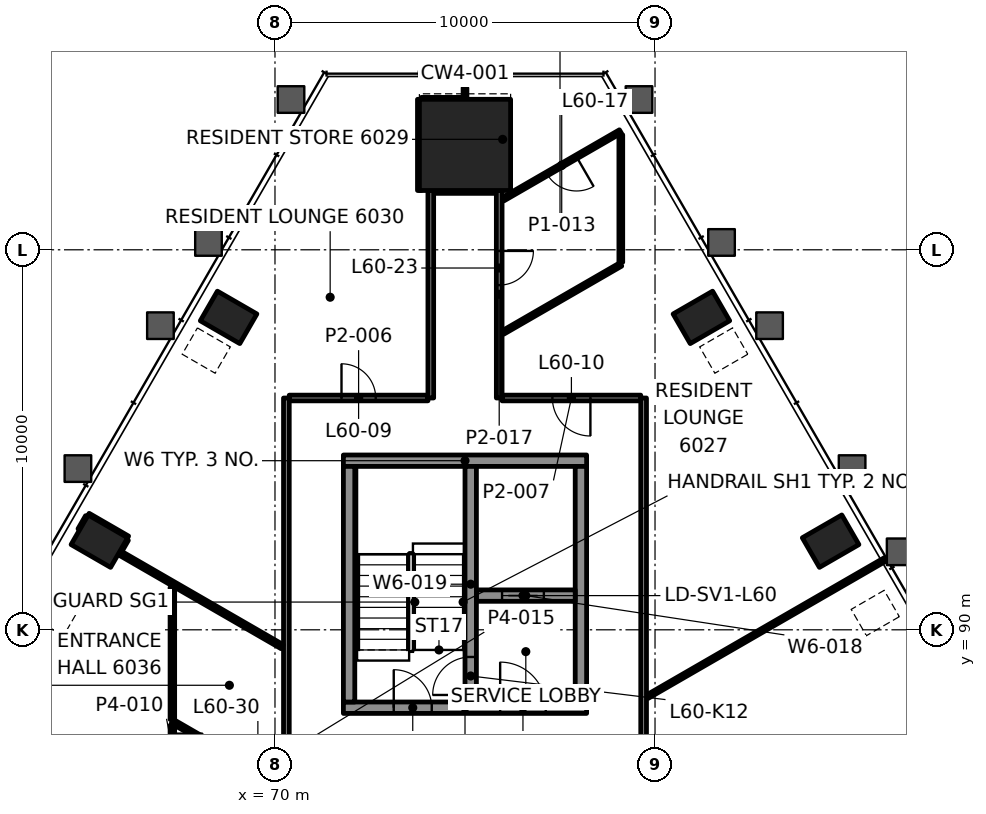
"""IFC4 building model, lengths in metres.
Left out: names, types, materials, properties, quantities, classifications, styles, units other than length and angle.
Written with IfcOpenShell. Run it as: python <this file> out.ifc"""

import sys

from ifc_helpers import new_model, si_unit, direction, frame, frame_2d, origin, origin_2d, place, context, subcontext, project, spatial, rectangle, hollow_rectangle, extrude, element, fill, save


model = new_model("IFC4")
c1 = context("Model", 3, precision=1e-05, world=origin(), true_north=direction((0.0, 1.0)))
c2 = subcontext(c1, "Body", "Model", "MODEL_VIEW")
j1 = project(units=[si_unit("LENGTHUNIT", "METRE"), si_unit("PLANEANGLEUNIT", "RADIAN")], contexts=[c1])
p1 = place(None, origin())
s1 = spatial("IfcSite", under=j1, at=p1, CompositionType="ELEMENT")
p2 = place(p1, origin())
s2 = spatial("IfcBuilding", under=s1, at=p2, CompositionType="ELEMENT")
p3 = place(p2, frame((0.0, 0.0, 256.6)))
s3 = spatial("IfcBuildingStorey", under=s2, at=p3, CompositionType="ELEMENT", Elevation=256.6)
p4 = place(p3, frame((75.0, 102.76, 0.0), z_axis=(0.0, 0.0, 1.0), x_axis=(-1.0, 0.0, 0.0)))
e1 = element("IfcColumn", 1, at=p4, inside=s3, PredefinedType="COLUMN", context=c2, shape_type="SweptSolid", body=[
    extrude(rectangle(XDim=2.4, YDim=2.4, at=origin_2d()), origin(), (0.0, 0.0, 1.0), 3.5),
])
for number, where, z_axis, x_axis in (
    (2, (84.621, 92.332, -0.0), (0.0, 0.0, 1.0), (-0.5, 0.866, 0.0)),
    (3, (81.22, 98.221, -0.0), (0.0, 0.0, 1.0), (-0.5, 0.866, 0.0)),
    (4, (68.78, 98.221, -0.0), (0.0, 0.0, 1.0), (-0.5, -0.866, 0.0)),
    (5, (65.379, 92.332, -0.0), (0.0, 0.0, 1.0), (-0.5, -0.866, 0.0)),
):
    element("IfcColumn", number, at=place(p3, frame(where, z_axis=z_axis, x_axis=x_axis)), inside=s3, PredefinedType="COLUMN", context=c2, shape_type="SweptSolid", body=[
        extrude(hollow_rectangle(XDim=0.9, YDim=1.2, WallThickness=0.06, at=origin_2d()), origin(), (0.0, 0.0, 1.0), 3.5),
    ])
p5 = place(p3, frame((71.8, 87.95, 0.0), z_axis=(0.0, 0.0, 1.0), x_axis=(1.0, 0.0, 0.0)))
e6 = element("IfcWall", 6, at=p5, inside=s3, PredefinedType="SHEAR", context=c2, shape_type="SweptSolid", body=[
    extrude(rectangle(XDim=6.4, YDim=0.3, at=frame_2d((3.2, 0.0))), origin(), (0.0, 0.0, 1.0), 3.3),
])
p6 = place(p5, frame((1.325, 0.0, 0.0)))
e7 = element("IfcOpeningElement", 7, at=p6, cuts=e6, PredefinedType="OPENING", context=c2, shape_type="SweptSolid", body=[
    extrude(rectangle(XDim=1.0, YDim=2.1, at=frame_2d((0.5, 1.05))), frame((0.0, 0.16, 0.0), z_axis=(0.0, -1.0, 0.0), x_axis=(1.0, 0.0, 0.0)), (0.0, 0.0, 1.0), 0.32),
])
p7 = place(p5, frame((4.125, 0.0, 0.0)))
e8 = element("IfcOpeningElement", 8, at=p7, cuts=e6, PredefinedType="OPENING", context=c2, shape_type="SweptSolid", body=[
    extrude(rectangle(XDim=1.2, YDim=2.1, at=frame_2d((0.6, 1.05))), frame((0.0, 0.16, 0.0), z_axis=(0.0, -1.0, 0.0), x_axis=(1.0, 0.0, 0.0)), (0.0, 0.0, 1.0), 0.32),
])
p8 = place(p3, frame((71.8, 94.45, 0.0), z_axis=(0.0, 0.0, 1.0), x_axis=(1.0, 0.0, 0.0)))
e9 = element("IfcWall", 9, at=p8, inside=s3, PredefinedType="SHEAR", context=c2, shape_type="SweptSolid", body=[
    extrude(rectangle(XDim=6.4, YDim=0.3, at=frame_2d((3.2, 0.0))), origin(), (0.0, 0.0, 1.0), 3.3),
])
for number, where, z_axis, x_axis in (
    (10, (71.95, 88.1, 0.0), (0.0, 0.0, 1.0), (0.0, 1.0, 0.0)),
    (11, (78.05, 88.1, 0.0), (0.0, 0.0, 1.0), (0.0, 1.0, 0.0)),
):
    element("IfcWall", number, at=place(p3, frame(where, z_axis=z_axis, x_axis=x_axis)), inside=s3, PredefinedType="SHEAR", context=c2, shape_type="SweptSolid", body=[
        extrude(rectangle(XDim=6.2, YDim=0.3, at=frame_2d((3.1, 0.0))), origin(), (0.0, 0.0, 1.0), 3.3),
    ])
p9 = place(p3, frame((75.3, 90.9, 0.0), z_axis=(0.0, 0.0, 1.0), x_axis=(1.0, 0.0, 0.0)))
e12 = element("IfcWall", 12, at=p9, inside=s3, PredefinedType="SHEAR", context=c2, shape_type="SweptSolid", body=[
    extrude(rectangle(XDim=2.6, YDim=0.3, at=frame_2d((1.3, 0.0))), origin(), (0.0, 0.0, 1.0), 3.3),
])
p10 = place(p9, frame((0.675, 0.0, 0.0)))
e13 = element("IfcOpeningElement", 13, at=p10, cuts=e12, PredefinedType="OPENING", context=c2, shape_type="SweptSolid", body=[
    extrude(rectangle(XDim=1.1, YDim=2.1, at=frame_2d((0.55, 1.05))), frame((0.0, 0.16, 0.0), z_axis=(0.0, -1.0, 0.0), x_axis=(1.0, 0.0, 0.0)), (0.0, 0.0, 1.0), 0.32),
])
p11 = place(p3, frame((75.15, 88.1, 0.0), z_axis=(0.0, 0.0, 1.0), x_axis=(0.0, 1.0, 0.0)))
e14 = element("IfcWall", 14, at=p11, inside=s3, PredefinedType="SHEAR", context=c2, shape_type="SweptSolid", body=[
    extrude(rectangle(XDim=6.2, YDim=0.3, at=frame_2d((3.1, 0.0))), origin(), (0.0, 0.0, 1.0), 3.3),
])
p12 = place(p11, frame((0.185, 0.0, 0.0)))
e15 = element("IfcOpeningElement", 15, at=p12, cuts=e14, PredefinedType="OPENING", context=c2, shape_type="SweptSolid", body=[
    extrude(rectangle(XDim=1.0, YDim=2.1, at=frame_2d((0.5, 1.05))), frame((0.0, 0.16, 0.0), z_axis=(0.0, -1.0, 0.0), x_axis=(1.0, 0.0, 0.0)), (0.0, 0.0, 1.0), 0.32),
])
p13 = place(p3, frame((70.375, 96.1, 0.0), z_axis=(0.0, 0.0, 1.0), x_axis=(1.0, 0.0, 0.0)))
e16 = element("IfcWall", 16, at=p13, inside=s3, PredefinedType="PARTITIONING", context=c2, shape_type="SweptSolid", body=[
    extrude(rectangle(XDim=3.649, YDim=0.15, at=frame_2d((1.825, 0.0))), origin(), (0.0, 0.0, 1.0), 2.7),
])
p14 = place(p13, frame((1.375, 0.0, 0.0)))
e17 = element("IfcOpeningElement", 17, at=p14, cuts=e16, PredefinedType="OPENING", context=c2, shape_type="SweptSolid", body=[
    extrude(rectangle(XDim=0.9, YDim=2.1, at=frame_2d((0.45, 1.05))), frame((0.0, 0.085, 0.0), z_axis=(0.0, -1.0, 0.0), x_axis=(1.0, 0.0, 0.0)), (0.0, 0.0, 1.0), 0.17),
])
p15 = place(p3, frame((79.625, 96.1, 0.0), z_axis=(0.0, 0.0, 1.0), x_axis=(-1.0, 0.0, 0.0)))
e18 = element("IfcWall", 18, at=p15, inside=s3, PredefinedType="PARTITIONING", context=c2, shape_type="SweptSolid", body=[
    extrude(rectangle(XDim=3.649, YDim=0.15, at=frame_2d((1.825, 0.0))), origin(), (0.0, 0.0, 1.0), 2.7),
])
p16 = place(p15, frame((1.325, 0.0, 0.0)))
e19 = element("IfcOpeningElement", 19, at=p16, cuts=e18, PredefinedType="OPENING", context=c2, shape_type="SweptSolid", body=[
    extrude(rectangle(XDim=1.0, YDim=2.1, at=frame_2d((0.5, 1.05))), frame((0.0, 0.085, 0.0), z_axis=(0.0, -1.0, 0.0), x_axis=(1.0, 0.0, 0.0)), (0.0, 0.0, 1.0), 0.17),
])
p17 = place(p3, frame((74.18, 101.56, 0.0), z_axis=(0.0, 0.0, 1.0), x_axis=(1.0, 0.0, 0.0)))
e20 = element("IfcWall", 20, at=p17, inside=s3, PredefinedType="PARTITIONING", context=c2, shape_type="SweptSolid", body=[
    extrude(rectangle(XDim=1.644, YDim=0.15, at=frame_2d((0.822, 0.0))), origin(), (0.0, 0.0, 1.0), 2.697),
])
p18 = place(p3, frame((73.851, 103.96, 0.0), z_axis=(0.0, 0.0, 1.0), x_axis=(1.0, 0.0, 0.0)))
e21 = element("IfcWall", 21, at=p18, inside=s3, PredefinedType="PARTITIONING", context=c2, shape_type="SweptSolid", body=[
    extrude(rectangle(XDim=1.149, YDim=0.1, at=frame_2d((0.575, 0.0))), origin(), (0.0, 0.0, 1.0), 2.7),
])
p19 = place(p3, frame((79.801, 88.241, 0.0), z_axis=(0.0, 0.0, 1.0), x_axis=(0.866016076598, 0.500016154812, 0.0)))
e22 = element("IfcWall", 22, at=p19, inside=s3, PredefinedType="PARTITIONING", context=c2, shape_type="SweptSolid", body=[
    extrude(rectangle(XDim=7.219, YDim=0.1, at=frame_2d((3.61, 0.0))), origin(), (0.0, 0.0, 1.0), 2.688),
])
p20 = place(p3, frame((76.001, 97.825, 0.0), z_axis=(0.0, 0.0, 1.0), x_axis=(0.866021986329, 0.500005919159, 0.0)))
e23 = element("IfcWall", 23, at=p20, inside=s3, PredefinedType="PARTITIONING", context=c2, shape_type="SweptSolid", body=[
    extrude(rectangle(XDim=3.579, YDim=0.1, at=frame_2d((1.789, 0.0))), origin(), (0.0, 0.0, 1.0), 2.7),
])
p21 = place(p3, frame((79.089, 103.114, 0.0), z_axis=(0.0, 0.0, 1.0), x_axis=(-0.866000835515, -0.500042551078, 0.0)))
e24 = element("IfcWall", 24, at=p21, inside=s3, PredefinedType="PARTITIONING", context=c2, shape_type="SweptSolid", body=[
    extrude(rectangle(XDim=3.565, YDim=0.1, at=frame_2d((1.783, 0.0))), origin(), (0.0, 0.0, 1.0), 2.7),
])
p22 = place(p21, frame((1.333, 0.0, 0.0)))
e25 = element("IfcOpeningElement", 25, at=p22, cuts=e24, PredefinedType="OPENING", context=c2, shape_type="SweptSolid", body=[
    extrude(rectangle(XDim=0.9, YDim=2.1, at=frame_2d((0.45, 1.05))), frame((0.0, 0.06, 0.0), z_axis=(0.0, -1.0, 0.0), x_axis=(1.0, 0.0, 0.0)), (0.0, 0.0, 1.0), 0.12),
])
p23 = place(p3, frame((65.929, 92.085, 0.0), z_axis=(0.0, 0.0, 1.0), x_axis=(0.49970167553, 0.866197573001, 0.0)))
e26 = element("IfcWall", 26, at=p23, inside=s3, PredefinedType="PARTITIONING", context=c2, shape_type="SweptSolid", body=[
    extrude(rectangle(XDim=0.339, YDim=0.1, at=frame_2d((0.169, 0.0))), origin(), (0.0, 0.0, 1.0), 2.7),
])
p24 = place(p3, frame((64.86, 92.633, 0.0), z_axis=(0.0, 0.0, 1.0), x_axis=(0.500481453673, 0.865747257882, 0.0)))
e27 = element("IfcWall", 27, at=p24, inside=s3, PredefinedType="PARTITIONING", context=c2, shape_type="SweptSolid", body=[
    extrude(rectangle(XDim=0.399, YDim=0.1, at=frame_2d((0.199, 0.0))), origin(), (0.0, 0.0, 1.0), 2.7),
])
p25 = place(p3, frame((79.7, 86.301, 0.0), z_axis=(0.0, 0.0, 1.0), x_axis=(0.0, 1.0, 0.0)))
e28 = element("IfcWall", 28, at=p25, inside=s3, PredefinedType="PARTITIONING", context=c2, shape_type="SweptSolid", body=[
    extrude(rectangle(XDim=9.799, YDim=0.15, at=frame_2d((4.899, 0.0))), origin(), (0.0, 0.0, 1.0), 2.7),
])
p26 = place(p3, frame((79.1, 99.672, 0.0), z_axis=(0.0, 0.0, 1.0), x_axis=(0.0, 1.0, 0.0)))
e29 = element("IfcWall", 29, at=p26, inside=s3, PredefinedType="PARTITIONING", context=c2, shape_type="SweptSolid", body=[
    extrude(rectangle(XDim=3.354, YDim=0.1, at=frame_2d((1.677, 0.0))), origin(), (0.0, 0.0, 1.0), 2.7),
])
p27 = place(p3, frame((75.9, 101.56, 0.0), z_axis=(0.0, 0.0, 1.0), x_axis=(0.0, -1.0, 0.0)))
e30 = element("IfcWall", 30, at=p27, inside=s3, PredefinedType="PARTITIONING", context=c2, shape_type="SweptSolid", body=[
    extrude(rectangle(XDim=5.46, YDim=0.15, at=frame_2d((2.73, 0.0))), origin(), (0.0, 0.0, 1.0), 2.7),
])
p28 = place(p27, frame((1.59, 0.0, 0.0)))
e31 = element("IfcOpeningElement", 31, at=p28, cuts=e30, PredefinedType="OPENING", context=c2, shape_type="SweptSolid", body=[
    extrude(rectangle(XDim=0.9, YDim=2.1, at=frame_2d((0.45, 1.05))), frame((0.0, 0.085, 0.0), z_axis=(0.0, -1.0, 0.0), x_axis=(1.0, 0.0, 0.0)), (0.0, 0.0, 1.0), 0.17),
])
p29 = place(p3, frame((75.0, 104.01, 0.0), z_axis=(0.0, 0.0, 1.0), x_axis=(0.0, 1.0, 0.0)))
e32 = element("IfcWall", 32, at=p29, inside=s3, PredefinedType="PARTITIONING", context=c2, shape_type="SweptSolid", body=[
    extrude(rectangle(XDim=0.25, YDim=0.1, at=frame_2d((0.125, 0.0))), origin(), (0.0, 0.0, 1.0), 2.7),
])
p30 = place(p3, frame((74.1, 96.1, 0.0), z_axis=(0.0, 0.0, 1.0), x_axis=(0.0, 1.0, 0.0)))
e33 = element("IfcWall", 33, at=p30, inside=s3, PredefinedType="PARTITIONING", context=c2, shape_type="SweptSolid", body=[
    extrude(rectangle(XDim=5.46, YDim=0.15, at=frame_2d((2.73, 0.0))), origin(), (0.0, 0.0, 1.0), 2.7),
])
p31 = place(p3, frame((73.8, 101.561, 0.0), z_axis=(0.0, 0.0, 1.0), x_axis=(0.0, 1.0, 0.0)))
e34 = element("IfcWall", 34, at=p31, inside=s3, PredefinedType="PARTITIONING", context=c2, shape_type="SweptSolid", body=[
    extrude(rectangle(XDim=2.399, YDim=0.1, at=frame_2d((1.199, 0.0))), origin(), (0.0, 0.0, 1.0), 2.7),
])
p32 = place(p3, frame((70.3, 86.3, 0.0), z_axis=(0.0, 0.0, 1.0), x_axis=(0.0, 1.0, 0.0)))
e35 = element("IfcWall", 35, at=p32, inside=s3, PredefinedType="PARTITIONING", context=c2, shape_type="SweptSolid", body=[
    extrude(rectangle(XDim=9.8, YDim=0.15, at=frame_2d((4.9, 0.0))), origin(), (0.0, 0.0, 1.0), 2.7),
])
p33 = place(p3, frame((67.3, 87.485, 0.0), z_axis=(0.0, 0.0, 1.0), x_axis=(0.0, -1.0, 0.0)))
e36 = element("IfcWall", 36, at=p33, inside=s3, PredefinedType="PARTITIONING", context=c2, shape_type="SweptSolid", body=[
    extrude(rectangle(XDim=1.234, YDim=0.12, at=frame_2d((0.617, 0.0))), origin(), (0.0, 0.0, 1.0), 2.622),
])
p34 = place(p33, frame((0.217, 0.0, 0.0)))
e37 = element("IfcOpeningElement", 37, at=p34, cuts=e36, PredefinedType="OPENING", context=c2, shape_type="SweptSolid", body=[
    extrude(rectangle(XDim=0.8, YDim=2.1, at=frame_2d((0.4, 1.05))), frame((0.0, 0.07, 0.0), z_axis=(0.0, -1.0, 0.0), x_axis=(1.0, 0.0, 0.0)), (0.0, 0.0, 1.0), 0.14),
])
p35 = place(p3, frame((66.124, 92.422, 0.0), z_axis=(0.0, 0.0, 1.0), x_axis=(-0.865978732077, 0.500080829057, 0.0)))
e38 = element("IfcWall", 38, at=p35, inside=s3, PredefinedType="PARTITIONING", context=c2, shape_type="SweptSolid", body=[
    extrude(rectangle(XDim=1.199, YDim=0.1, at=frame_2d((0.6, 0.0))), origin(), (0.0, 0.0, 1.0), 2.688),
])
p36 = place(p3, frame((70.19, 89.555, 0.0), z_axis=(0.0, 0.0, 1.0), x_axis=(-0.866036249428, 0.499981214323, 0.0)))
e39 = element("IfcWall", 39, at=p36, inside=s3, PredefinedType="PARTITIONING", context=c2, shape_type="SweptSolid", body=[
    extrude(rectangle(XDim=4.955, YDim=0.12, at=frame_2d((2.478, 0.0))), origin(), (0.0, 0.0, 1.0), 2.7),
])
p37 = place(p3, frame((67.3, 87.589, 0.0), z_axis=(0.0, 0.0, 1.0), x_axis=(0.866019710441, -0.50000986103, 0.0)))
e40 = element("IfcWall", 40, at=p37, inside=s3, PredefinedType="PARTITIONING", context=c2, shape_type="SweptSolid", body=[
    extrude(rectangle(XDim=5.196, YDim=0.12, at=frame_2d((2.598, 0.0))), origin(), (0.0, 0.0, 1.0), 2.7),
])
p38 = place(p37, frame((2.198, 0.0, 0.0)))
e41 = element("IfcOpeningElement", 41, at=p38, cuts=e40, PredefinedType="OPENING", context=c2, shape_type="SweptSolid", body=[
    extrude(rectangle(XDim=0.8, YDim=2.1, at=frame_2d((0.4, 1.05))), frame((0.0, 0.07, 0.0), z_axis=(0.0, -1.0, 0.0), x_axis=(1.0, 0.0, 0.0)), (0.0, 0.0, 1.0), 0.14),
])
p39 = place(p3, frame((67.3, 87.641, 0.0), z_axis=(0.0, 0.0, 1.0), x_axis=(0.0, 1.0, 0.0)))
e42 = element("IfcWall", 42, at=p39, inside=s3, PredefinedType="PARTITIONING", context=c2, shape_type="SweptSolid", body=[
    extrude(rectangle(XDim=3.473, YDim=0.12, at=frame_2d((1.737, 0.0))), origin(), (0.0, 0.0, 1.0), 2.7),
])
p40 = place(p14, origin())
e43 = element("IfcDoor", 43, at=p40, inside=s3, OperationType="SINGLE_SWING_LEFT", PredefinedType="DOOR", context=c2, shape_type="SweptSolid", body=[
    extrude(rectangle(XDim=0.9, YDim=2.1, at=frame_2d((0.45, 1.05))), frame((0.0, 0.025, 0.0), z_axis=(0.0, -1.0, 0.0), x_axis=(1.0, 0.0, 0.0)), (0.0, 0.0, 1.0), 0.05),
])
fill(e17, e43)
p41 = place(p16, origin())
e44 = element("IfcDoor", 44, at=p41, inside=s3, OperationType="SINGLE_SWING_LEFT", PredefinedType="DOOR", context=c2, shape_type="SweptSolid", body=[
    extrude(rectangle(XDim=1.0, YDim=2.1, at=frame_2d((0.5, 1.05))), frame((0.0, 0.025, 0.0), z_axis=(0.0, -1.0, 0.0), x_axis=(1.0, 0.0, 0.0)), (0.0, 0.0, 1.0), 0.05),
])
fill(e19, e44)
p42 = place(p22, origin())
e45 = element("IfcDoor", 45, at=p42, inside=s3, OperationType="SINGLE_SWING_LEFT", PredefinedType="DOOR", context=c2, shape_type="SweptSolid", body=[
    extrude(rectangle(XDim=0.9, YDim=2.1, at=frame_2d((0.45, 1.05))), frame((0.0, 0.025, 0.0), z_axis=(0.0, -1.0, 0.0), x_axis=(1.0, 0.0, 0.0)), (0.0, 0.0, 1.0), 0.05),
])
fill(e25, e45)
p43 = place(p28, origin())
e46 = element("IfcDoor", 46, at=p43, inside=s3, OperationType="SINGLE_SWING_RIGHT", PredefinedType="DOOR", context=c2, shape_type="SweptSolid", body=[
    extrude(rectangle(XDim=0.9, YDim=2.1, at=frame_2d((0.45, 1.05))), frame((0.0, 0.025, 0.0), z_axis=(0.0, -1.0, 0.0), x_axis=(1.0, 0.0, 0.0)), (0.0, 0.0, 1.0), 0.05),
])
fill(e31, e46)
p44 = place(p10, origin())
e47 = element("IfcDoor", 47, at=p44, inside=s3, OperationType="DOUBLE_DOOR_SLIDING", PredefinedType="DOOR", context=c2, shape_type="SweptSolid", body=[
    extrude(rectangle(XDim=1.1, YDim=2.1, at=frame_2d((0.55, 1.05))), frame((0.0, 0.025, 0.0), z_axis=(0.0, -1.0, 0.0), x_axis=(1.0, 0.0, 0.0)), (0.0, 0.0, 1.0), 0.05),
])
fill(e13, e47)
p45 = place(p6, origin())
e48 = element("IfcDoor", 48, at=p45, inside=s3, OperationType="SINGLE_SWING_RIGHT", PredefinedType="DOOR", context=c2, shape_type="SweptSolid", body=[
    extrude(rectangle(XDim=1.0, YDim=2.1, at=frame_2d((0.5, 1.05))), frame((0.0, 0.025, 0.0), z_axis=(0.0, -1.0, 0.0), x_axis=(1.0, 0.0, 0.0)), (0.0, 0.0, 1.0), 0.05),
])
fill(e7, e48)
p46 = place(p12, origin())
e49 = element("IfcDoor", 49, at=p46, inside=s3, OperationType="SINGLE_SWING_LEFT", PredefinedType="DOOR", context=c2, shape_type="SweptSolid", body=[
    extrude(rectangle(XDim=1.0, YDim=2.1, at=frame_2d((0.5, 1.05))), frame((0.0, 0.025, 0.0), z_axis=(0.0, -1.0, 0.0), x_axis=(1.0, 0.0, 0.0)), (0.0, 0.0, 1.0), 0.05),
])
fill(e15, e49)
p47 = place(p7, origin())
e50 = element("IfcDoor", 50, at=p47, inside=s3, OperationType="SINGLE_SWING_RIGHT", PredefinedType="DOOR", context=c2, shape_type="SweptSolid", body=[
    extrude(rectangle(XDim=1.2, YDim=2.1, at=frame_2d((0.6, 1.05))), frame((0.0, 0.025, 0.0), z_axis=(0.0, -1.0, 0.0), x_axis=(1.0, 0.0, 0.0)), (0.0, 0.0, 1.0), 0.05),
])
fill(e8, e50)
save(model, sys.argv[1])
